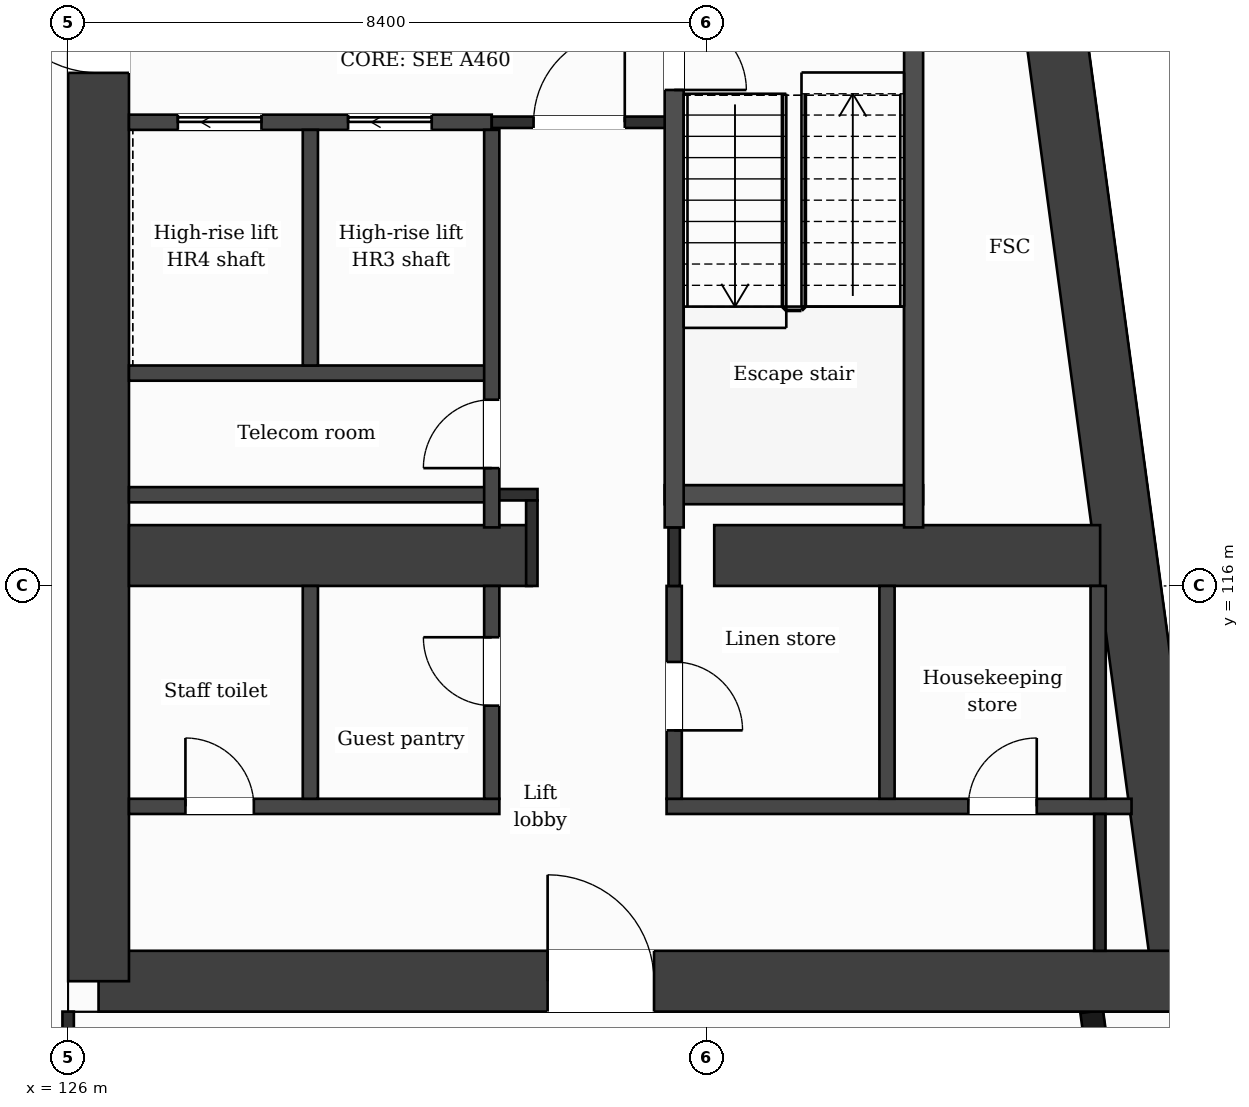
"""IFC4 building model, lengths in metres.
Left out: names, types, materials, properties, quantities, classifications, styles, units other than length and angle.
Written with IfcOpenShell. Run it as: python <this file> out.ifc"""

import sys

from ifc_helpers import new_model, si_unit, direction, frame, frame_2d, origin, place, context, subcontext, project, spatial, rectangle, extrude, element, fill, save


model = new_model("IFC4")
c1 = context("Model", 3, precision=1e-05, world=origin(), true_north=direction((0.0, 1.0)))
c2 = subcontext(c1, "Body", "Model", "MODEL_VIEW")
j1 = project(units=[si_unit("LENGTHUNIT", "METRE"), si_unit("PLANEANGLEUNIT", "RADIAN")], contexts=[c1])
p1 = place(None, origin())
s1 = spatial("IfcSite", under=j1, at=p1, CompositionType="ELEMENT")
p2 = place(p1, origin())
s2 = spatial("IfcBuilding", under=s1, at=p2, CompositionType="ELEMENT")
p3 = place(p2, frame((0.0, 0.0, 242.9)))
s3 = spatial("IfcBuildingStorey", under=s2, at=p3, CompositionType="ELEMENT", Elevation=242.9)
p4 = place(p3, frame((137.82, 132.0, 0.0), z_axis=(0.0, 0.0, 1.0), x_axis=(0.133408347329, -0.991061154956, 0.0)))
e1 = element("IfcWall", 1, at=p4, inside=s3, PredefinedType="SHEAR", context=c2, shape_type="SweptSolid", body=[
    extrude(rectangle(XDim=21.391, YDim=0.8, at=frame_2d((10.696, 0.0))), origin(), (0.0, 0.0, 1.0), 3.7),
])
p5 = place(p3, frame((140.673, 110.8, 0.0), z_axis=(0.0, 0.0, 1.0), x_axis=(-1.0, 0.0, 0.0)))
e2 = element("IfcWall", 2, at=p5, inside=s3, PredefinedType="SHEAR", context=c2, shape_type="SweptSolid", body=[
    extrude(rectangle(XDim=14.273, YDim=0.8, at=frame_2d((7.137, 0.0))), origin(), (0.0, 0.0, 1.0), 3.7),
])
p6 = place(p5, frame((6.965, 0.0, 0.0)))
e3 = element("IfcOpeningElement", 3, at=p6, cuts=e2, PredefinedType="OPENING", context=c2, shape_type="SweptSolid", body=[
    extrude(rectangle(XDim=1.4, YDim=2.1, at=frame_2d((0.7, 1.05))), frame((0.0, 0.41, 0.0), z_axis=(0.0, -1.0, 0.0), x_axis=(1.0, 0.0, 0.0)), (0.0, 0.0, 1.0), 0.82),
])
p7 = place(p3, frame((126.4, 110.8, 0.0), z_axis=(0.0, 0.0, 1.0), x_axis=(0.0, 1.0, 0.0)))
e4 = element("IfcWall", 4, at=p7, inside=s3, PredefinedType="SHEAR", context=c2, shape_type="SweptSolid", body=[
    extrude(rectangle(XDim=21.2, YDim=0.8, at=frame_2d((10.6, 0.0))), origin(), (0.0, 0.0, 1.0), 3.7),
])
p8 = place(p7, frame((11.95, 0.0, 0.0)))
e5 = element("IfcOpeningElement", 5, at=p8, cuts=e4, PredefinedType="OPENING", context=c2, shape_type="SweptSolid", body=[
    extrude(rectangle(XDim=1.4, YDim=2.1, at=frame_2d((0.7, 1.05))), frame((0.0, 0.41, 0.0), z_axis=(0.0, -1.0, 0.0), x_axis=(1.0, 0.0, 0.0)), (0.0, 0.0, 1.0), 0.82),
])
p9 = place(p3, frame((126.8, 116.4, 0.0), z_axis=(0.0, 0.0, 1.0), x_axis=(1.0, 0.0, 0.0)))
e6 = element("IfcWall", 6, at=p9, inside=s3, PredefinedType="SHEAR", context=c2, shape_type="SweptSolid", body=[
    extrude(rectangle(XDim=5.3, YDim=0.8, at=frame_2d((2.65, 0.0))), origin(), (0.0, 0.0, 1.0), 3.7),
])
p10 = place(p3, frame((134.5, 116.4, 0.0), z_axis=(0.0, 0.0, 1.0), x_axis=(1.0, 0.0, 0.0)))
e7 = element("IfcWall", 7, at=p10, inside=s3, PredefinedType="SHEAR", context=c2, shape_type="SweptSolid", body=[
    extrude(rectangle(XDim=5.077, YDim=0.8, at=frame_2d((2.539, 0.0))), origin(), (0.0, 0.0, 1.0), 3.7),
])
p11 = place(p3, frame((140.348, 103.85, 0.0), z_axis=(0.0, 0.0, 1.0), x_axis=(-0.133431549479, 0.991058031401, 0.0)))
e8 = element("IfcWall", 8, at=p11, inside=s3, PredefinedType="SOLIDWALL", context=c2, shape_type="SweptSolid", body=[
    extrude(rectangle(XDim=6.609, YDim=0.3, at=frame_2d((3.304, 0.0))), origin(), (0.0, 0.0, 1.0), 3.2),
])
p12 = place(p11, frame((0.737, 0.0, 0.9)))
e9 = element("IfcOpeningElement", 9, at=p12, cuts=e8, PredefinedType="OPENING", context=c2, shape_type="SweptSolid", body=[
    extrude(rectangle(XDim=1.2, YDim=2.1, at=frame_2d((0.6, 1.05))), frame((0.0, 0.16, 0.0), z_axis=(0.0, -1.0, 0.0), x_axis=(1.0, 0.0, 0.0)), (0.0, 0.0, 1.0), 0.32),
])
p13 = place(p11, frame((3.991, 0.0, 0.0)))
e10 = element("IfcOpeningElement", 10, at=p13, cuts=e8, PredefinedType="OPENING", context=c2, shape_type="SweptSolid", body=[
    extrude(rectangle(XDim=1.2, YDim=2.4, at=frame_2d((0.6, 1.2))), frame((0.0, 0.16, 0.0), z_axis=(0.0, -1.0, 0.0), x_axis=(1.0, 0.0, 0.0)), (0.0, 0.0, 1.0), 0.32),
])
p14 = place(p3, frame((126.8, 113.1, 0.0), z_axis=(0.0, 0.0, 1.0), x_axis=(1.0, 0.0, 0.0)))
e11 = element("IfcWall", 11, at=p14, inside=s3, PredefinedType="PARTITIONING", context=c2, shape_type="SweptSolid", body=[
    extrude(rectangle(XDim=4.873, YDim=0.2, at=frame_2d((2.437, 0.0))), origin(), (0.0, 0.0, 1.0), 3.2),
])
p15 = place(p14, frame((0.743, 0.0, 0.0)))
e12 = element("IfcOpeningElement", 12, at=p15, cuts=e11, PredefinedType="OPENING", context=c2, shape_type="SweptSolid", body=[
    extrude(rectangle(XDim=0.9, YDim=2.1, at=frame_2d((0.45, 1.05))), frame((0.0, 0.11, 0.0), z_axis=(0.0, -1.0, 0.0), x_axis=(1.0, 0.0, 0.0)), (0.0, 0.0, 1.0), 0.22),
])
p16 = place(p3, frame((133.873, 113.1, 0.0), z_axis=(0.0, 0.0, 1.0), x_axis=(1.0, 0.0, 0.0)))
e13 = element("IfcWall", 13, at=p16, inside=s3, PredefinedType="PARTITIONING", context=c2, shape_type="SweptSolid", body=[
    extrude(rectangle(XDim=6.117, YDim=0.2, at=frame_2d((3.059, 0.0))), origin(), (0.0, 0.0, 1.0), 3.2),
])
p17 = place(p16, frame((3.97, 0.0, 0.0)))
e14 = element("IfcOpeningElement", 14, at=p17, cuts=e13, PredefinedType="OPENING", context=c2, shape_type="SweptSolid", body=[
    extrude(rectangle(XDim=0.9, YDim=2.1, at=frame_2d((0.45, 1.05))), frame((0.0, 0.11, 0.0), z_axis=(0.0, -1.0, 0.0), x_axis=(1.0, 0.0, 0.0)), (0.0, 0.0, 1.0), 0.22),
])
p18 = place(p3, frame((126.8, 117.2, 0.0), z_axis=(0.0, 0.0, 1.0), x_axis=(1.0, 0.0, 0.0)))
e15 = element("IfcWall", 15, at=p18, inside=s3, PredefinedType="PARTITIONING", context=c2, shape_type="SweptSolid", body=[
    extrude(rectangle(XDim=4.773, YDim=0.2, at=frame_2d((2.386, 0.0))), origin(), (0.0, 0.0, 1.0), 3.2),
])
p19 = place(p3, frame((131.573, 117.2, 0.0), z_axis=(0.0, 0.0, 1.0), x_axis=(1.0, 0.0, 0.0)))
e16 = element("IfcWall", 16, at=p19, inside=s3, PredefinedType="PARTITIONING", context=c2, shape_type="SweptSolid", body=[
    extrude(rectangle(XDim=0.602, YDim=0.15, at=frame_2d((0.301, 0.0))), origin(), (0.0, 0.0, 1.0), 3.2),
])
p20 = place(p3, frame((133.848, 117.2, 0.0), z_axis=(0.0, 0.0, 1.0), x_axis=(1.0, 0.0, 0.0)))
e17 = element("IfcWall", 17, at=p20, inside=s3, PredefinedType="PARTITIONING", context=c2, shape_type="SweptSolid", body=[
    extrude(rectangle(XDim=3.4, YDim=0.25, at=frame_2d((1.7, 0.0))), origin(), (0.0, 0.0, 1.0), 3.2),
])
p21 = place(p3, frame((126.8, 118.8, 0.0), z_axis=(0.0, 0.0, 1.0), x_axis=(1.0, 0.0, 0.0)))
e18 = element("IfcWall", 18, at=p21, inside=s3, PredefinedType="PARTITIONING", context=c2, shape_type="SweptSolid", body=[
    extrude(rectangle(XDim=4.773, YDim=0.2, at=frame_2d((2.386, 0.0))), origin(), (0.0, 0.0, 1.0), 3.2),
])
p22 = place(p3, frame((126.8, 122.1, 0.0), z_axis=(0.0, 0.0, 1.0), x_axis=(1.0, 0.0, 0.0)))
e19 = element("IfcWall", 19, at=p22, inside=s3, PredefinedType="PARTITIONING", context=c2, shape_type="SweptSolid", body=[
    extrude(rectangle(XDim=4.773, YDim=0.2, at=frame_2d((2.386, 0.0))), origin(), (0.0, 0.0, 1.0), 3.2),
])
p23 = place(p22, frame((2.883, 0.0, 0.0)))
e20 = element("IfcOpeningElement", 20, at=p23, cuts=e19, PredefinedType="OPENING", context=c2, shape_type="SweptSolid", body=[
    extrude(rectangle(XDim=1.1, YDim=2.1, at=frame_2d((0.55, 1.05))), frame((0.0, 0.11, 0.0), z_axis=(0.0, -1.0, 0.0), x_axis=(1.0, 0.0, 0.0)), (0.0, 0.0, 1.0), 0.22),
])
p24 = place(p22, frame((0.643, 0.0, 0.0)))
e21 = element("IfcOpeningElement", 21, at=p24, cuts=e19, PredefinedType="OPENING", context=c2, shape_type="SweptSolid", body=[
    extrude(rectangle(XDim=1.1, YDim=2.1, at=frame_2d((0.55, 1.05))), frame((0.0, 0.11, 0.0), z_axis=(0.0, -1.0, 0.0), x_axis=(1.0, 0.0, 0.0)), (0.0, 0.0, 1.0), 0.22),
])
p25 = place(p3, frame((131.573, 122.1, 0.0), z_axis=(0.0, 0.0, 1.0), x_axis=(1.0, 0.0, 0.0)))
e22 = element("IfcWall", 22, at=p25, inside=s3, PredefinedType="PARTITIONING", context=c2, shape_type="SweptSolid", body=[
    extrude(rectangle(XDim=2.4, YDim=0.15, at=frame_2d((1.2, 0.0))), origin(), (0.0, 0.0, 1.0), 3.2),
])
p26 = place(p25, frame((0.55, 0.0, 0.0)))
e23 = element("IfcOpeningElement", 23, at=p26, cuts=e22, PredefinedType="OPENING", context=c2, shape_type="SweptSolid", body=[
    extrude(rectangle(XDim=1.2, YDim=2.1, at=frame_2d((0.6, 1.05))), frame((0.0, 0.085, 0.0), z_axis=(0.0, -1.0, 0.0), x_axis=(1.0, 0.0, 0.0)), (0.0, 0.0, 1.0), 0.17),
])
p27 = place(p3, frame((126.0, 109.075, 0.0), z_axis=(0.0, 0.0, 1.0), x_axis=(0.0, 1.0, 0.0)))
e24 = element("IfcWall", 24, at=p27, inside=s3, PredefinedType="PARTITIONING", context=c2, shape_type="SweptSolid", body=[
    extrude(rectangle(XDim=1.325, YDim=0.15, at=frame_2d((0.663, 0.0))), origin(), (0.0, 0.0, 1.0), 3.2),
])
p28 = place(p3, frame((129.187, 113.2, 0.0), z_axis=(0.0, 0.0, 1.0), x_axis=(0.0, 1.0, 0.0)))
e25 = element("IfcWall", 25, at=p28, inside=s3, PredefinedType="PARTITIONING", context=c2, shape_type="SweptSolid", body=[
    extrude(rectangle(XDim=2.8, YDim=0.2, at=frame_2d((1.4, 0.0))), origin(), (0.0, 0.0, 1.0), 3.2),
])
p29 = place(p3, frame((129.187, 118.9, 0.0), z_axis=(0.0, 0.0, 1.0), x_axis=(0.0, 1.0, 0.0)))
e26 = element("IfcWall", 26, at=p29, inside=s3, PredefinedType="PARTITIONING", context=c2, shape_type="SweptSolid", body=[
    extrude(rectangle(XDim=3.1, YDim=0.2, at=frame_2d((1.55, 0.0))), origin(), (0.0, 0.0, 1.0), 3.2),
])
p30 = place(p3, frame((131.573, 113.2, 0.0), z_axis=(0.0, 0.0, 1.0), x_axis=(0.0, 1.0, 0.0)))
e27 = element("IfcWall", 27, at=p30, inside=s3, PredefinedType="PARTITIONING", context=c2, shape_type="SweptSolid", body=[
    extrude(rectangle(XDim=2.8, YDim=0.2, at=frame_2d((1.4, 0.0))), origin(), (0.0, 0.0, 1.0), 3.2),
])
p31 = place(p30, frame((1.225, 0.0, 0.0)))
e28 = element("IfcOpeningElement", 28, at=p31, cuts=e27, PredefinedType="OPENING", context=c2, shape_type="SweptSolid", body=[
    extrude(rectangle(XDim=0.9, YDim=2.1, at=frame_2d((0.45, 1.05))), frame((0.0, 0.11, 0.0), z_axis=(0.0, -1.0, 0.0), x_axis=(1.0, 0.0, 0.0)), (0.0, 0.0, 1.0), 0.22),
])
p32 = place(p3, frame((131.573, 116.77, 0.0), z_axis=(0.0, 0.0, 1.0), x_axis=(0.0, 1.0, 0.0)))
e29 = element("IfcWall", 29, at=p32, inside=s3, PredefinedType="PARTITIONING", context=c2, shape_type="SweptSolid", body=[
    extrude(rectangle(XDim=5.23, YDim=0.2, at=frame_2d((2.615, 0.0))), origin(), (0.0, 0.0, 1.0), 3.2),
])
p33 = place(p32, frame((0.78, 0.0, 0.0)))
e30 = element("IfcOpeningElement", 30, at=p33, cuts=e29, PredefinedType="OPENING", context=c2, shape_type="SweptSolid", body=[
    extrude(rectangle(XDim=0.9, YDim=2.1, at=frame_2d((0.45, 1.05))), frame((0.0, 0.11, 0.0), z_axis=(0.0, -1.0, 0.0), x_axis=(1.0, 0.0, 0.0)), (0.0, 0.0, 1.0), 0.22),
])
p34 = place(p3, frame((132.1, 116.0, 0.0), z_axis=(0.0, 0.0, 1.0), x_axis=(0.0, 1.0, 0.0)))
e31 = element("IfcWall", 31, at=p34, inside=s3, PredefinedType="PARTITIONING", context=c2, shape_type="SweptSolid", body=[
    extrude(rectangle(XDim=1.125, YDim=0.15, at=frame_2d((0.562, 0.0))), origin(), (0.0, 0.0, 1.0), 3.2),
])
p35 = place(p3, frame((133.973, 113.2, 0.0), z_axis=(0.0, 0.0, 1.0), x_axis=(0.0, 1.0, 0.0)))
e32 = element("IfcWall", 32, at=p35, inside=s3, PredefinedType="PARTITIONING", context=c2, shape_type="SweptSolid", body=[
    extrude(rectangle(XDim=2.8, YDim=0.2, at=frame_2d((1.4, 0.0))), origin(), (0.0, 0.0, 1.0), 3.2),
])
p36 = place(p35, frame((0.9, 0.0, 0.0)))
e33 = element("IfcOpeningElement", 33, at=p36, cuts=e32, PredefinedType="OPENING", context=c2, shape_type="SweptSolid", body=[
    extrude(rectangle(XDim=0.9, YDim=2.1, at=frame_2d((0.45, 1.05))), frame((0.0, 0.11, 0.0), z_axis=(0.0, -1.0, 0.0), x_axis=(1.0, 0.0, 0.0)), (0.0, 0.0, 1.0), 0.22),
])
p37 = place(p3, frame((133.973, 116.0, 0.0), z_axis=(0.0, 0.0, 1.0), x_axis=(0.0, 1.0, 0.0)))
e34 = element("IfcWall", 34, at=p37, inside=s3, PredefinedType="PARTITIONING", context=c2, shape_type="SweptSolid", body=[
    extrude(rectangle(XDim=0.77, YDim=0.15, at=frame_2d((0.385, 0.0))), origin(), (0.0, 0.0, 1.0), 3.2),
])
p38 = place(p3, frame((133.973, 116.77, 0.0), z_axis=(0.0, 0.0, 1.0), x_axis=(0.0, 1.0, 0.0)))
e35 = element("IfcWall", 35, at=p38, inside=s3, PredefinedType="PARTITIONING", context=c2, shape_type="SweptSolid", body=[
    extrude(rectangle(XDim=7.055, YDim=0.25, at=frame_2d((3.527, 0.0))), origin(), (0.0, 0.0, 1.0), 3.2),
])
p39 = place(p38, frame((5.755, 0.0, 0.0)))
e36 = element("IfcOpeningElement", 36, at=p39, cuts=e35, PredefinedType="OPENING", context=c2, shape_type="SweptSolid", body=[
    extrude(rectangle(XDim=0.95, YDim=2.1, at=frame_2d((0.475, 1.05))), frame((0.0, 0.135, 0.0), z_axis=(0.0, -1.0, 0.0), x_axis=(1.0, 0.0, 0.0)), (0.0, 0.0, 1.0), 0.27),
])
p40 = place(p3, frame((136.773, 113.2, 0.0), z_axis=(0.0, 0.0, 1.0), x_axis=(0.0, 1.0, 0.0)))
e37 = element("IfcWall", 37, at=p40, inside=s3, PredefinedType="PARTITIONING", context=c2, shape_type="SweptSolid", body=[
    extrude(rectangle(XDim=2.8, YDim=0.2, at=frame_2d((1.4, 0.0))), origin(), (0.0, 0.0, 1.0), 3.2),
])
p41 = place(p3, frame((137.123, 116.77, 0.0), z_axis=(0.0, 0.0, 1.0), x_axis=(0.0, 1.0, 0.0)))
e38 = element("IfcWall", 38, at=p41, inside=s3, PredefinedType="PARTITIONING", context=c2, shape_type="SweptSolid", body=[
    extrude(rectangle(XDim=7.055, YDim=0.25, at=frame_2d((3.527, 0.0))), origin(), (0.0, 0.0, 1.0), 3.2),
])
p42 = place(p3, frame((139.551, 113.2, 0.0), z_axis=(0.0, 0.0, 1.0), x_axis=(0.0, 1.0, 0.0)))
e39 = element("IfcWall", 39, at=p42, inside=s3, PredefinedType="PARTITIONING", context=c2, shape_type="SweptSolid", body=[
    extrude(rectangle(XDim=2.8, YDim=0.2, at=frame_2d((1.4, 0.0))), origin(), (0.0, 0.0, 1.0), 3.2),
])
p43 = place(p3, frame((139.573, 111.2, 0.0), z_axis=(0.0, 0.0, 1.0), x_axis=(0.0, 1.0, 0.0)))
e40 = element("IfcWall", 40, at=p43, inside=s3, PredefinedType="PARTITIONING", context=c2, shape_type="SweptSolid", body=[
    extrude(rectangle(XDim=1.8, YDim=0.15, at=frame_2d((0.9, 0.0))), origin(), (0.0, 0.0, 1.0), 3.2),
])
p44 = place(p26, origin())
e41 = element("IfcDoor", 41, at=p44, inside=s3, OperationType="SINGLE_SWING_RIGHT", PredefinedType="DOOR", context=c2, shape_type="SweptSolid", body=[
    extrude(rectangle(XDim=1.2, YDim=2.1, at=frame_2d((0.6, 1.05))), frame((0.0, 0.025, 0.0), z_axis=(0.0, -1.0, 0.0), x_axis=(1.0, 0.0, 0.0)), (0.0, 0.0, 1.0), 0.05),
])
fill(e23, e41)
p45 = place(p23, origin())
e42 = element("IfcDoor", 42, at=p45, inside=s3, OperationType="SLIDING_TO_LEFT", PredefinedType="DOOR", context=c2, shape_type="SweptSolid", body=[
    extrude(rectangle(XDim=1.1, YDim=2.1, at=frame_2d((0.55, 1.05))), frame((0.0, 0.025, 0.0), z_axis=(0.0, -1.0, 0.0), x_axis=(1.0, 0.0, 0.0)), (0.0, 0.0, 1.0), 0.05),
])
fill(e20, e42)
p46 = place(p24, origin())
e43 = element("IfcDoor", 43, at=p46, inside=s3, OperationType="SLIDING_TO_LEFT", PredefinedType="DOOR", context=c2, shape_type="SweptSolid", body=[
    extrude(rectangle(XDim=1.1, YDim=2.1, at=frame_2d((0.55, 1.05))), frame((0.0, 0.025, 0.0), z_axis=(0.0, -1.0, 0.0), x_axis=(1.0, 0.0, 0.0)), (0.0, 0.0, 1.0), 0.05),
])
fill(e21, e43)
p47 = place(p39, origin())
e44 = element("IfcDoor", 44, at=p47, inside=s3, OperationType="SINGLE_SWING_LEFT", PredefinedType="DOOR", context=c2, shape_type="SweptSolid", body=[
    extrude(rectangle(XDim=0.95, YDim=2.1, at=frame_2d((0.475, 1.05))), frame((0.0, 0.025, 0.0), z_axis=(0.0, -1.0, 0.0), x_axis=(1.0, 0.0, 0.0)), (0.0, 0.0, 1.0), 0.05),
])
fill(e36, e44)
p48 = place(p33, origin())
e45 = element("IfcDoor", 45, at=p48, inside=s3, OperationType="SINGLE_SWING_LEFT", PredefinedType="DOOR", context=c2, shape_type="SweptSolid", body=[
    extrude(rectangle(XDim=0.9, YDim=2.1, at=frame_2d((0.45, 1.05))), frame((0.0, 0.025, 0.0), z_axis=(0.0, -1.0, 0.0), x_axis=(1.0, 0.0, 0.0)), (0.0, 0.0, 1.0), 0.05),
])
fill(e30, e45)
p49 = place(p17, origin())
e46 = element("IfcDoor", 46, at=p49, inside=s3, OperationType="SINGLE_SWING_RIGHT", PredefinedType="DOOR", context=c2, shape_type="SweptSolid", body=[
    extrude(rectangle(XDim=0.9, YDim=2.1, at=frame_2d((0.45, 1.05))), frame((0.0, 0.025, 0.0), z_axis=(0.0, -1.0, 0.0), x_axis=(1.0, 0.0, 0.0)), (0.0, 0.0, 1.0), 0.05),
])
fill(e14, e46)
p50 = place(p36, origin())
e47 = element("IfcDoor", 47, at=p50, inside=s3, OperationType="SINGLE_SWING_LEFT", PredefinedType="DOOR", context=c2, shape_type="SweptSolid", body=[
    extrude(rectangle(XDim=0.9, YDim=2.1, at=frame_2d((0.45, 1.05))), frame((0.0, 0.025, 0.0), z_axis=(0.0, -1.0, 0.0), x_axis=(1.0, 0.0, 0.0)), (0.0, 0.0, 1.0), 0.05),
])
fill(e33, e47)
p51 = place(p31, origin())
e48 = element("IfcDoor", 48, at=p51, inside=s3, OperationType="SINGLE_SWING_RIGHT", PredefinedType="DOOR", context=c2, shape_type="SweptSolid", body=[
    extrude(rectangle(XDim=0.9, YDim=2.1, at=frame_2d((0.45, 1.05))), frame((0.0, 0.025, 0.0), z_axis=(0.0, -1.0, 0.0), x_axis=(1.0, 0.0, 0.0)), (0.0, 0.0, 1.0), 0.05),
])
fill(e28, e48)
p52 = place(p15, origin())
e49 = element("IfcDoor", 49, at=p52, inside=s3, OperationType="SINGLE_SWING_LEFT", PredefinedType="DOOR", context=c2, shape_type="SweptSolid", body=[
    extrude(rectangle(XDim=0.9, YDim=2.1, at=frame_2d((0.45, 1.05))), frame((0.0, 0.025, 0.0), z_axis=(0.0, -1.0, 0.0), x_axis=(1.0, 0.0, 0.0)), (0.0, 0.0, 1.0), 0.05),
])
fill(e12, e49)
p53 = place(p6, origin())
e50 = element("IfcDoor", 50, at=p53, inside=s3, OperationType="SINGLE_SWING_RIGHT", PredefinedType="DOOR", context=c2, shape_type="SweptSolid", body=[
    extrude(rectangle(XDim=1.4, YDim=2.1, at=frame_2d((0.7, 1.05))), frame((0.0, 0.025, 0.0), z_axis=(0.0, -1.0, 0.0), x_axis=(1.0, 0.0, 0.0)), (0.0, 0.0, 1.0), 0.05),
])
fill(e3, e50)
p54 = place(p8, origin())
e51 = element("IfcDoor", 51, at=p54, inside=s3, OperationType="SINGLE_SWING_RIGHT", PredefinedType="DOOR", context=c2, shape_type="SweptSolid", body=[
    extrude(rectangle(XDim=1.4, YDim=2.1, at=frame_2d((0.7, 1.05))), frame((0.0, 0.025, 0.0), z_axis=(0.0, -1.0, 0.0), x_axis=(1.0, 0.0, 0.0)), (0.0, 0.0, 1.0), 0.05),
])
fill(e5, e51)
save(model, sys.argv[1])
